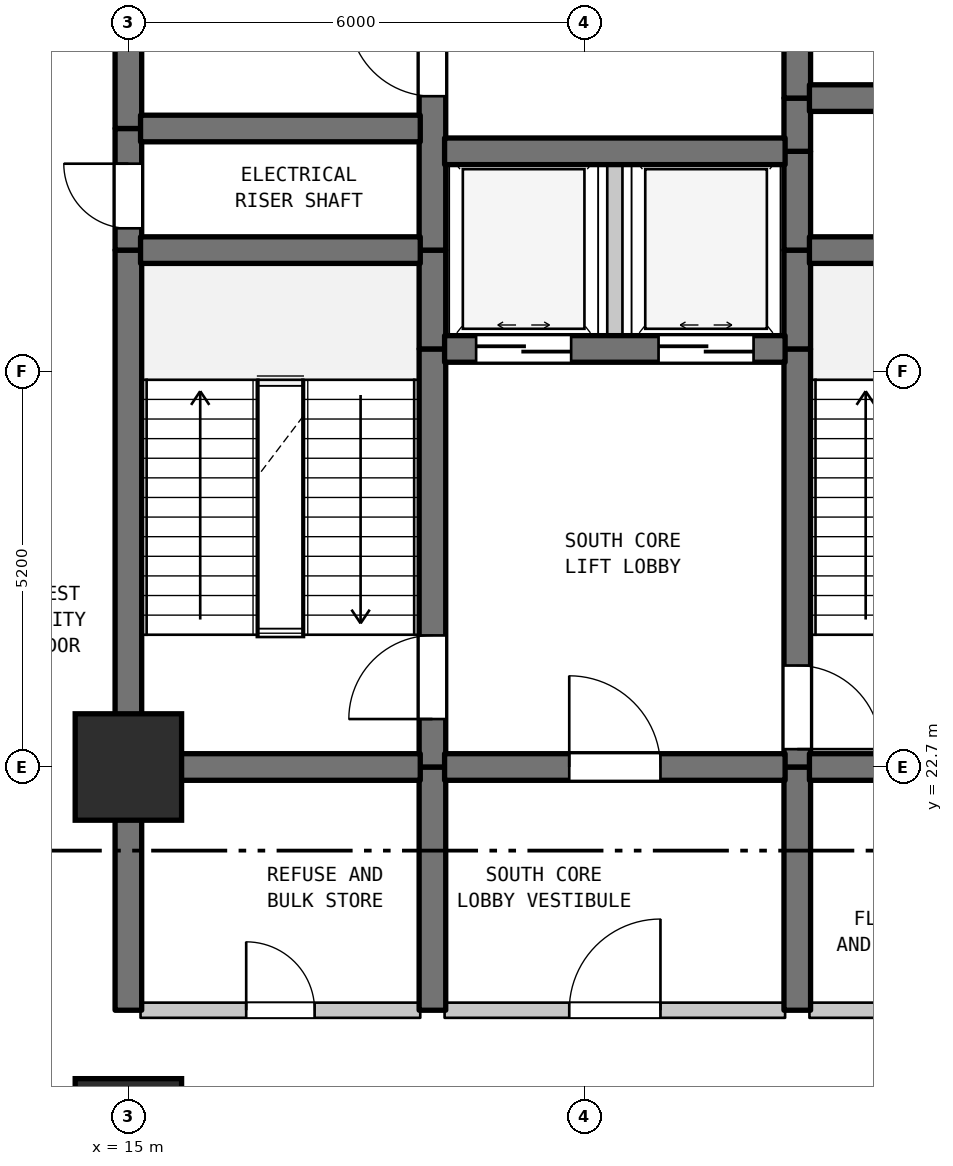
"""IFC4 building model, lengths in metres.
Left out: names, types, materials, properties, quantities, classifications, styles, units other than length and angle.
Written with IfcOpenShell. Run it as: python <this file> out.ifc"""

import sys

from ifc_helpers import new_model, si_unit, direction, frame, frame_2d, origin, origin_2d, place, context, subcontext, project, spatial, rectangle, extrude, element, fill, save


model = new_model("IFC4")
c1 = context("Model", 3, precision=1e-05, world=origin(), true_north=direction((0.0, 1.0)))
c2 = subcontext(c1, "Body", "Model", "MODEL_VIEW")
j1 = project(units=[si_unit("LENGTHUNIT", "METRE"), si_unit("PLANEANGLEUNIT", "RADIAN")], contexts=[c1])
p1 = place(None, origin())
s1 = spatial("IfcSite", under=j1, at=p1, CompositionType="ELEMENT")
p2 = place(p1, origin())
s2 = spatial("IfcBuilding", under=s1, at=p2, CompositionType="ELEMENT")
p3 = place(p2, frame((0.0, 0.0, 19.0)))
s3 = spatial("IfcBuildingStorey", under=s2, at=p3, CompositionType="ELEMENT", Elevation=19.0)
for number, where, z_axis, x_axis in (
    (1, (15.0, 17.9, 0.0), (0.0, 0.0, 1.0), (1.0, 0.0, 0.0)),
    (2, (15.0, 22.7, 0.0), (0.0, 0.0, 1.0), (1.0, 0.0, 0.0)),
):
    element("IfcColumn", number, at=place(p3, frame(where, z_axis=z_axis, x_axis=x_axis)), inside=s3, PredefinedType="COLUMN", context=c2, shape_type="SweptSolid", body=[
        extrude(rectangle(XDim=1.4, YDim=1.4, at=origin_2d()), origin(), (0.0, 0.0, 1.0), 5.0),
    ])
p4 = place(p3, frame((15.0, 19.5, 0.0), z_axis=(0.0, 0.0, 1.0), x_axis=(0.0, 1.0, 0.0)))
e3 = element("IfcWall", 3, at=p4, inside=s3, PredefinedType="SHEAR", context=c2, shape_type="SweptSolid", body=[
    extrude(rectangle(XDim=3.2, YDim=0.35, at=frame_2d((1.6, 0.0))), origin(), (0.0, 0.0, 1.0), 4.685),
])
p5 = place(p3, frame((15.0, 22.7, 0.0), z_axis=(0.0, 0.0, 1.0), x_axis=(0.0, 1.0, 0.0)))
e4 = element("IfcWall", 4, at=p5, inside=s3, PredefinedType="SHEAR", context=c2, shape_type="SweptSolid", body=[
    extrude(rectangle(XDim=6.8, YDim=0.35, at=frame_2d((3.4, 0.0))), origin(), (0.0, 0.0, 1.0), 4.685),
])
p6 = place(p3, frame((15.0, 29.5, 0.0), z_axis=(0.0, 0.0, 1.0), x_axis=(0.0, 1.0, 0.0)))
e5 = element("IfcWall", 5, at=p6, inside=s3, PredefinedType="SHEAR", context=c2, shape_type="SweptSolid", body=[
    extrude(rectangle(XDim=1.6, YDim=0.35, at=frame_2d((0.8, 0.0))), origin(), (0.0, 0.0, 1.0), 4.685),
])
p7 = place(p6, frame((0.287, 0.0, 0.0)))
e6 = element("IfcOpeningElement", 6, at=p7, cuts=e5, PredefinedType="OPENING", context=c2, shape_type="SweptSolid", body=[
    extrude(rectangle(XDim=0.85, YDim=2.1, at=frame_2d((0.425, 1.05))), frame((0.0, 0.185, 0.0), z_axis=(0.0, -1.0, 0.0), x_axis=(1.0, 0.0, 0.0)), (0.0, 0.0, 1.0), 0.37),
])
p8 = place(p3, frame((15.0, 31.1, 0.0), z_axis=(0.0, 0.0, 1.0), x_axis=(0.0, 1.0, 0.0)))
e7 = element("IfcWall", 7, at=p8, inside=s3, PredefinedType="SHEAR", context=c2, shape_type="SweptSolid", body=[
    extrude(rectangle(XDim=6.8, YDim=0.35, at=frame_2d((3.4, 0.0))), origin(), (0.0, 0.0, 1.0), 4.685),
])
p9 = place(p3, frame((19.0, 19.5, 0.0), z_axis=(0.0, 0.0, 1.0), x_axis=(0.0, 1.0, 0.0)))
e8 = element("IfcWall", 8, at=p9, inside=s3, PredefinedType="SHEAR", context=c2, shape_type="SweptSolid", body=[
    extrude(rectangle(XDim=3.2, YDim=0.35, at=frame_2d((1.6, 0.0))), origin(), (0.0, 0.0, 1.0), 4.685),
])
p10 = place(p3, frame((19.0, 22.7, 0.0), z_axis=(0.0, 0.0, 1.0), x_axis=(0.0, 1.0, 0.0)))
e9 = element("IfcWall", 9, at=p10, inside=s3, PredefinedType="SHEAR", context=c2, shape_type="SweptSolid", body=[
    extrude(rectangle(XDim=5.5, YDim=0.35, at=frame_2d((2.75, 0.0))), origin(), (0.0, 0.0, 1.0), 4.685),
])
p11 = place(p10, frame((0.631, 0.0, 0.0)))
e10 = element("IfcOpeningElement", 10, at=p11, cuts=e9, PredefinedType="OPENING", context=c2, shape_type="SweptSolid", body=[
    extrude(rectangle(XDim=1.1, YDim=2.15, at=frame_2d((0.55, 1.075))), frame((0.0, 0.185, 0.0), z_axis=(0.0, -1.0, 0.0), x_axis=(1.0, 0.0, 0.0)), (0.0, 0.0, 1.0), 0.37),
])
p12 = place(p3, frame((19.0, 28.2, 0.0), z_axis=(0.0, 0.0, 1.0), x_axis=(0.0, 1.0, 0.0)))
e11 = element("IfcWall", 11, at=p12, inside=s3, PredefinedType="SHEAR", context=c2, shape_type="SweptSolid", body=[
    extrude(rectangle(XDim=1.3, YDim=0.35, at=frame_2d((0.65, 0.0))), origin(), (0.0, 0.0, 1.0), 4.685),
])
p13 = place(p3, frame((19.0, 29.5, 0.0), z_axis=(0.0, 0.0, 1.0), x_axis=(0.0, 1.0, 0.0)))
e12 = element("IfcWall", 12, at=p13, inside=s3, PredefinedType="SHEAR", context=c2, shape_type="SweptSolid", body=[
    extrude(rectangle(XDim=5.5, YDim=0.35, at=frame_2d((2.75, 0.0))), origin(), (0.0, 0.0, 1.0), 4.685),
])
p14 = place(p13, frame((2.025, 0.0, 0.0)))
e13 = element("IfcOpeningElement", 13, at=p14, cuts=e12, PredefinedType="OPENING", context=c2, shape_type="SweptSolid", body=[
    extrude(rectangle(XDim=1.1, YDim=2.15, at=frame_2d((0.55, 1.075))), frame((0.0, 0.185, 0.0), z_axis=(0.0, -1.0, 0.0), x_axis=(1.0, 0.0, 0.0)), (0.0, 0.0, 1.0), 0.37),
])
p15 = place(p3, frame((21.4, 28.2, 0.0), z_axis=(0.0, 0.0, 1.0), x_axis=(0.0, 1.0, 0.0)))
e14 = element("IfcWall", 14, at=p15, inside=s3, PredefinedType="STANDARD", context=c2, shape_type="SweptSolid", body=[
    extrude(rectangle(XDim=2.6, YDim=0.2, at=frame_2d((1.3, 0.0))), origin(), (0.0, 0.0, 1.0), 4.685),
])
p16 = place(p3, frame((23.8, 19.5, 0.0), z_axis=(0.0, 0.0, 1.0), x_axis=(0.0, 1.0, 0.0)))
e15 = element("IfcWall", 15, at=p16, inside=s3, PredefinedType="SHEAR", context=c2, shape_type="SweptSolid", body=[
    extrude(rectangle(XDim=3.2, YDim=0.35, at=frame_2d((1.6, 0.0))), origin(), (0.0, 0.0, 1.0), 4.685),
])
p17 = place(p3, frame((23.8, 22.7, 0.0), z_axis=(0.0, 0.0, 1.0), x_axis=(0.0, 1.0, 0.0)))
e16 = element("IfcWall", 16, at=p17, inside=s3, PredefinedType="SHEAR", context=c2, shape_type="SweptSolid", body=[
    extrude(rectangle(XDim=5.5, YDim=0.35, at=frame_2d((2.75, 0.0))), origin(), (0.0, 0.0, 1.0), 4.685),
])
p18 = place(p17, frame((0.235, 0.0, 0.0)))
e17 = element("IfcOpeningElement", 17, at=p18, cuts=e16, PredefinedType="OPENING", context=c2, shape_type="SweptSolid", body=[
    extrude(rectangle(XDim=1.1, YDim=2.15, at=frame_2d((0.55, 1.075))), frame((0.0, 0.185, 0.0), z_axis=(0.0, -1.0, 0.0), x_axis=(1.0, 0.0, 0.0)), (0.0, 0.0, 1.0), 0.37),
])
for number, where, z_axis, x_axis in (
    (18, (23.8, 28.2, 0.0), (0.0, 0.0, 1.0), (0.0, 1.0, 0.0)),
    (19, (23.8, 29.5, 0.0), (0.0, 0.0, 1.0), (0.0, 1.0, 0.0)),
):
    element("IfcWall", number, at=place(p3, frame(where, z_axis=z_axis, x_axis=x_axis)), inside=s3, PredefinedType="SHEAR", context=c2, shape_type="SweptSolid", body=[
        extrude(rectangle(XDim=1.3, YDim=0.35, at=frame_2d((0.65, 0.0))), origin(), (0.0, 0.0, 1.0), 4.685),
    ])
p19 = place(p3, frame((23.8, 30.8, 0.0), z_axis=(0.0, 0.0, 1.0), x_axis=(0.0, 1.0, 0.0)))
e20 = element("IfcWall", 20, at=p19, inside=s3, PredefinedType="SHEAR", context=c2, shape_type="SweptSolid", body=[
    extrude(rectangle(XDim=0.7, YDim=0.35, at=frame_2d((0.35, 0.0))), origin(), (0.0, 0.0, 1.0), 4.685),
])
p20 = place(p3, frame((23.8, 31.5, 0.0), z_axis=(0.0, 0.0, 1.0), x_axis=(0.0, 1.0, 0.0)))
e21 = element("IfcWall", 21, at=p20, inside=s3, PredefinedType="SHEAR", context=c2, shape_type="SweptSolid", body=[
    extrude(rectangle(XDim=3.5, YDim=0.35, at=frame_2d((1.75, 0.0))), origin(), (0.0, 0.0, 1.0), 4.685),
])
p21 = place(p20, frame((1.127, 0.0, 0.0)))
e22 = element("IfcOpeningElement", 22, at=p21, cuts=e21, PredefinedType="OPENING", context=c2, shape_type="SweptSolid", body=[
    extrude(rectangle(XDim=1.1, YDim=2.15, at=frame_2d((0.55, 1.075))), frame((0.0, 0.185, 0.0), z_axis=(0.0, -1.0, 0.0), x_axis=(1.0, 0.0, 0.0)), (0.0, 0.0, 1.0), 0.37),
])
p22 = place(p3, frame((15.16, 19.5, 0.0), z_axis=(0.0, 0.0, 1.0), x_axis=(1.0, 0.0, 0.0)))
e23 = element("IfcWall", 23, at=p22, inside=s3, PredefinedType="STANDARD", context=c2, shape_type="SweptSolid", body=[
    extrude(rectangle(XDim=3.68, YDim=0.2, at=frame_2d((1.84, 0.0))), origin(), (0.0, 0.0, 1.0), 4.685),
])
p23 = place(p22, frame((1.39, 0.0, 0.0)))
e24 = element("IfcOpeningElement", 24, at=p23, cuts=e23, PredefinedType="OPENING", context=c2, shape_type="SweptSolid", body=[
    extrude(rectangle(XDim=0.9, YDim=2.15, at=frame_2d((0.45, 1.075))), frame((0.0, 0.11, 0.0), z_axis=(0.0, -1.0, 0.0), x_axis=(1.0, 0.0, 0.0)), (0.0, 0.0, 1.0), 0.22),
])
p24 = place(p3, frame((19.16, 19.5, 0.0), z_axis=(0.0, 0.0, 1.0), x_axis=(1.0, 0.0, 0.0)))
e25 = element("IfcWall", 25, at=p24, inside=s3, PredefinedType="STANDARD", context=c2, shape_type="SweptSolid", body=[
    extrude(rectangle(XDim=4.48, YDim=0.2, at=frame_2d((2.24, 0.0))), origin(), (0.0, 0.0, 1.0), 4.685),
])
p25 = place(p24, frame((1.64, 0.0, 0.0)))
e26 = element("IfcOpeningElement", 26, at=p25, cuts=e25, PredefinedType="OPENING", context=c2, shape_type="SweptSolid", body=[
    extrude(rectangle(XDim=1.2, YDim=2.2, at=frame_2d((0.6, 1.1))), frame((0.0, 0.11, 0.0), z_axis=(0.0, -1.0, 0.0), x_axis=(1.0, 0.0, 0.0)), (0.0, 0.0, 1.0), 0.22),
])
p26 = place(p3, frame((23.96, 19.5, 0.0), z_axis=(0.0, 0.0, 1.0), x_axis=(1.0, 0.0, 0.0)))
e27 = element("IfcWall", 27, at=p26, inside=s3, PredefinedType="STANDARD", context=c2, shape_type="SweptSolid", body=[
    extrude(rectangle(XDim=3.155, YDim=0.2, at=frame_2d((1.578, 0.0))), origin(), (0.0, 0.0, 1.0), 4.685),
])
p27 = place(p26, frame((0.991, 0.0, 0.0)))
e28 = element("IfcOpeningElement", 28, at=p27, cuts=e27, PredefinedType="OPENING", context=c2, shape_type="SweptSolid", body=[
    extrude(rectangle(XDim=0.95, YDim=2.15, at=frame_2d((0.475, 1.075))), frame((0.0, 0.11, 0.0), z_axis=(0.0, -1.0, 0.0), x_axis=(1.0, 0.0, 0.0)), (0.0, 0.0, 1.0), 0.22),
])
p28 = place(p3, frame((15.16, 22.7, 0.0), z_axis=(0.0, 0.0, 1.0), x_axis=(1.0, 0.0, 0.0)))
e29 = element("IfcWall", 29, at=p28, inside=s3, PredefinedType="SHEAR", context=c2, shape_type="SweptSolid", body=[
    extrude(rectangle(XDim=3.68, YDim=0.35, at=frame_2d((1.84, 0.0))), origin(), (0.0, 0.0, 1.0), 4.685),
])
p29 = place(p3, frame((19.16, 22.7, 0.0), z_axis=(0.0, 0.0, 1.0), x_axis=(1.0, 0.0, 0.0)))
e30 = element("IfcWall", 30, at=p29, inside=s3, PredefinedType="SHEAR", context=c2, shape_type="SweptSolid", body=[
    extrude(rectangle(XDim=4.48, YDim=0.35, at=frame_2d((2.24, 0.0))), origin(), (0.0, 0.0, 1.0), 4.685),
])
p30 = place(p29, frame((1.64, 0.0, 0.0)))
e31 = element("IfcOpeningElement", 31, at=p30, cuts=e30, PredefinedType="OPENING", context=c2, shape_type="SweptSolid", body=[
    extrude(rectangle(XDim=1.2, YDim=2.2, at=frame_2d((0.6, 1.1))), frame((0.0, 0.185, 0.0), z_axis=(0.0, -1.0, 0.0), x_axis=(1.0, 0.0, 0.0)), (0.0, 0.0, 1.0), 0.37),
])
p31 = place(p3, frame((23.96, 22.7, 0.0), z_axis=(0.0, 0.0, 1.0), x_axis=(1.0, 0.0, 0.0)))
e32 = element("IfcWall", 32, at=p31, inside=s3, PredefinedType="SHEAR", context=c2, shape_type="SweptSolid", body=[
    extrude(rectangle(XDim=3.155, YDim=0.35, at=frame_2d((1.578, 0.0))), origin(), (0.0, 0.0, 1.0), 4.685),
])
p32 = place(p3, frame((19.16, 28.2, 0.0), z_axis=(0.0, 0.0, 1.0), x_axis=(1.0, 0.0, 0.0)))
e33 = element("IfcWall", 33, at=p32, inside=s3, PredefinedType="SHEAR", context=c2, shape_type="SweptSolid", body=[
    extrude(rectangle(XDim=4.48, YDim=0.35, at=frame_2d((2.24, 0.0))), origin(), (0.0, 0.0, 1.0), 4.685),
])
p33 = place(p32, frame((0.415, 0.0, 0.0)))
e34 = element("IfcOpeningElement", 34, at=p33, cuts=e33, PredefinedType="OPENING", context=c2, shape_type="SweptSolid", body=[
    extrude(rectangle(XDim=1.25, YDim=2.2, at=frame_2d((0.625, 1.1))), frame((0.0, 0.185, 0.0), z_axis=(0.0, -1.0, 0.0), x_axis=(1.0, 0.0, 0.0)), (0.0, 0.0, 1.0), 0.37),
])
p34 = place(p32, frame((2.815, 0.0, 0.0)))
e35 = element("IfcOpeningElement", 35, at=p34, cuts=e33, PredefinedType="OPENING", context=c2, shape_type="SweptSolid", body=[
    extrude(rectangle(XDim=1.25, YDim=2.2, at=frame_2d((0.625, 1.1))), frame((0.0, 0.185, 0.0), z_axis=(0.0, -1.0, 0.0), x_axis=(1.0, 0.0, 0.0)), (0.0, 0.0, 1.0), 0.37),
])
p35 = place(p3, frame((15.16, 29.5, 0.0), z_axis=(0.0, 0.0, 1.0), x_axis=(1.0, 0.0, 0.0)))
e36 = element("IfcWall", 36, at=p35, inside=s3, PredefinedType="SHEAR", context=c2, shape_type="SweptSolid", body=[
    extrude(rectangle(XDim=3.68, YDim=0.35, at=frame_2d((1.84, 0.0))), origin(), (0.0, 0.0, 1.0), 4.685),
])
p36 = place(p3, frame((23.96, 29.5, 0.0), z_axis=(0.0, 0.0, 1.0), x_axis=(1.0, 0.0, 0.0)))
e37 = element("IfcWall", 37, at=p36, inside=s3, PredefinedType="SHEAR", context=c2, shape_type="SweptSolid", body=[
    extrude(rectangle(XDim=3.18, YDim=0.35, at=frame_2d((1.59, 0.0))), origin(), (0.0, 0.0, 1.0), 4.685),
])
p37 = place(p3, frame((19.16, 30.8, 0.0), z_axis=(0.0, 0.0, 1.0), x_axis=(1.0, 0.0, 0.0)))
e38 = element("IfcWall", 38, at=p37, inside=s3, PredefinedType="SHEAR", context=c2, shape_type="SweptSolid", body=[
    extrude(rectangle(XDim=4.48, YDim=0.35, at=frame_2d((2.24, 0.0))), origin(), (0.0, 0.0, 1.0), 4.685),
])
p38 = place(p3, frame((15.16, 31.1, 0.0), z_axis=(0.0, 0.0, 1.0), x_axis=(1.0, 0.0, 0.0)))
e39 = element("IfcWall", 39, at=p38, inside=s3, PredefinedType="SHEAR", context=c2, shape_type="SweptSolid", body=[
    extrude(rectangle(XDim=3.68, YDim=0.35, at=frame_2d((1.84, 0.0))), origin(), (0.0, 0.0, 1.0), 4.685),
])
p39 = place(p3, frame((23.96, 31.5, 0.0), z_axis=(0.0, 0.0, 1.0), x_axis=(1.0, 0.0, 0.0)))
e40 = element("IfcWall", 40, at=p39, inside=s3, PredefinedType="SHEAR", context=c2, shape_type="SweptSolid", body=[
    extrude(rectangle(XDim=3.18, YDim=0.35, at=frame_2d((1.59, 0.0))), origin(), (0.0, 0.0, 1.0), 4.685),
])
p40 = place(p39, frame((1.094, 0.0, 0.0)))
e41 = element("IfcOpeningElement", 41, at=p40, cuts=e40, PredefinedType="OPENING", context=c2, shape_type="SweptSolid", body=[
    extrude(rectangle(XDim=0.85, YDim=2.1, at=frame_2d((0.425, 1.05))), frame((0.0, 0.185, 0.0), z_axis=(0.0, -1.0, 0.0), x_axis=(1.0, 0.0, 0.0)), (0.0, 0.0, 1.0), 0.37),
])
p41 = place(p3, frame((17.64, 9.686, 0.0), z_axis=(0.0, 0.0, 1.0), x_axis=(-0.747409318684, 0.66436383883, 0.0)))
e42 = element("IfcWall", 42, at=p41, inside=s3, PredefinedType="STANDARD", context=c2, shape_type="SweptSolid", body=[
    extrude(rectangle(XDim=18.204, YDim=0.26, at=frame_2d((9.102, 0.0))), origin(), (0.0, 0.0, 1.0), 4.685),
])
p42 = place(p41, origin())
e43 = element("IfcOpeningElement", 43, at=p42, cuts=e42, PredefinedType="OPENING", context=c2, shape_type="SweptSolid", body=[
    extrude(rectangle(XDim=1.4, YDim=2.2, at=frame_2d((0.7, 1.1))), frame((0.0, 0.14, 0.0), z_axis=(0.0, -1.0, 0.0), x_axis=(1.0, 0.0, 0.0)), (0.0, 0.0, 1.0), 0.28),
])
p43 = place(p41, frame((6.154, 0.0, 0.9)))
e44 = element("IfcOpeningElement", 44, at=p43, cuts=e42, PredefinedType="OPENING", context=c2, shape_type="SweptSolid", body=[
    extrude(rectangle(XDim=1.3, YDim=1.9, at=frame_2d((0.65, 0.95))), frame((0.0, 0.14, 0.0), z_axis=(0.0, -1.0, 0.0), x_axis=(1.0, 0.0, 0.0)), (0.0, 0.0, 1.0), 0.28),
])
p44 = place(p41, frame((8.587, 0.0, 0.9)))
e45 = element("IfcOpeningElement", 45, at=p44, cuts=e42, PredefinedType="OPENING", context=c2, shape_type="SweptSolid", body=[
    extrude(rectangle(XDim=1.4, YDim=1.85, at=frame_2d((0.7, 0.925))), frame((0.0, 0.14, 0.0), z_axis=(0.0, -1.0, 0.0), x_axis=(1.0, 0.0, 0.0)), (0.0, 0.0, 1.0), 0.28),
])
p45 = place(p41, frame((13.454, 0.0, 0.9)))
e46 = element("IfcOpeningElement", 46, at=p45, cuts=e42, PredefinedType="OPENING", context=c2, shape_type="SweptSolid", body=[
    extrude(rectangle(XDim=1.3, YDim=1.9, at=frame_2d((0.65, 0.95))), frame((0.0, 0.14, 0.0), z_axis=(0.0, -1.0, 0.0), x_axis=(1.0, 0.0, 0.0)), (0.0, 0.0, 1.0), 0.28),
])
p46 = place(p41, frame((15.887, 0.0, 0.9)))
e47 = element("IfcOpeningElement", 47, at=p46, cuts=e42, PredefinedType="OPENING", context=c2, shape_type="SweptSolid", body=[
    extrude(rectangle(XDim=1.4, YDim=1.85, at=frame_2d((0.7, 0.925))), frame((0.0, 0.14, 0.0), z_axis=(0.0, -1.0, 0.0), x_axis=(1.0, 0.0, 0.0)), (0.0, 0.0, 1.0), 0.28),
])
p47 = place(p7, origin())
e48 = element("IfcDoor", 48, at=p47, inside=s3, OperationType="SINGLE_SWING_RIGHT", PredefinedType="DOOR", context=c2, shape_type="SweptSolid", body=[
    extrude(rectangle(XDim=0.85, YDim=2.1, at=frame_2d((0.425, 1.05))), frame((0.0, 0.025, 0.0), z_axis=(0.0, -1.0, 0.0), x_axis=(1.0, 0.0, 0.0)), (0.0, 0.0, 1.0), 0.05),
])
fill(e6, e48)
p48 = place(p11, origin())
e49 = element("IfcDoor", 49, at=p48, inside=s3, OperationType="SINGLE_SWING_LEFT", PredefinedType="DOOR", context=c2, shape_type="SweptSolid", body=[
    extrude(rectangle(XDim=1.1, YDim=2.15, at=frame_2d((0.55, 1.075))), frame((0.0, 0.025, 0.0), z_axis=(0.0, -1.0, 0.0), x_axis=(1.0, 0.0, 0.0)), (0.0, 0.0, 1.0), 0.05),
])
fill(e10, e49)
p49 = place(p14, origin())
e50 = element("IfcDoor", 50, at=p49, inside=s3, OperationType="SINGLE_SWING_RIGHT", PredefinedType="DOOR", context=c2, shape_type="SweptSolid", body=[
    extrude(rectangle(XDim=1.1, YDim=2.15, at=frame_2d((0.55, 1.075))), frame((0.0, 0.025, 0.0), z_axis=(0.0, -1.0, 0.0), x_axis=(1.0, 0.0, 0.0)), (0.0, 0.0, 1.0), 0.05),
])
fill(e13, e50)
p50 = place(p18, frame((1.1, 0.0, 0.0), z_axis=(0.0, 0.0, 1.0), x_axis=(-1.0, 0.0, 0.0)))
e51 = element("IfcDoor", 51, at=p50, inside=s3, OperationType="SINGLE_SWING_LEFT", PredefinedType="DOOR", context=c2, shape_type="SweptSolid", body=[
    extrude(rectangle(XDim=1.1, YDim=2.15, at=frame_2d((0.55, 1.075))), frame((0.0, 0.025, 0.0), z_axis=(0.0, -1.0, 0.0), x_axis=(1.0, 0.0, 0.0)), (0.0, 0.0, 1.0), 0.05),
])
fill(e17, e51)
p51 = place(p23, origin())
e52 = element("IfcDoor", 52, at=p51, inside=s3, OperationType="SINGLE_SWING_LEFT", PredefinedType="DOOR", context=c2, shape_type="SweptSolid", body=[
    extrude(rectangle(XDim=0.9, YDim=2.15, at=frame_2d((0.45, 1.075))), frame((0.0, 0.025, 0.0), z_axis=(0.0, -1.0, 0.0), x_axis=(1.0, 0.0, 0.0)), (0.0, 0.0, 1.0), 0.05),
])
fill(e24, e52)
p52 = place(p25, origin())
e53 = element("IfcDoor", 53, at=p52, inside=s3, OperationType="SINGLE_SWING_RIGHT", PredefinedType="DOOR", context=c2, shape_type="SweptSolid", body=[
    extrude(rectangle(XDim=1.2, YDim=2.2, at=frame_2d((0.6, 1.1))), frame((0.0, 0.025, 0.0), z_axis=(0.0, -1.0, 0.0), x_axis=(1.0, 0.0, 0.0)), (0.0, 0.0, 1.0), 0.05),
])
fill(e26, e53)
p53 = place(p30, origin())
e54 = element("IfcDoor", 54, at=p53, inside=s3, OperationType="SINGLE_SWING_LEFT", PredefinedType="DOOR", context=c2, shape_type="SweptSolid", body=[
    extrude(rectangle(XDim=1.2, YDim=2.2, at=frame_2d((0.6, 1.1))), frame((0.0, 0.025, 0.0), z_axis=(0.0, -1.0, 0.0), x_axis=(1.0, 0.0, 0.0)), (0.0, 0.0, 1.0), 0.05),
])
fill(e31, e54)
p54 = place(p33, origin())
e55 = element("IfcDoor", 55, at=p54, inside=s3, OperationType="DOUBLE_DOOR_SLIDING", PredefinedType="DOOR", context=c2, shape_type="SweptSolid", body=[
    extrude(rectangle(XDim=1.25, YDim=2.2, at=frame_2d((0.625, 1.1))), frame((0.0, 0.025, 0.0), z_axis=(0.0, -1.0, 0.0), x_axis=(1.0, 0.0, 0.0)), (0.0, 0.0, 1.0), 0.05),
])
fill(e34, e55)
p55 = place(p34, origin())
e56 = element("IfcDoor", 56, at=p55, inside=s3, OperationType="DOUBLE_DOOR_SLIDING", PredefinedType="DOOR", context=c2, shape_type="SweptSolid", body=[
    extrude(rectangle(XDim=1.25, YDim=2.2, at=frame_2d((0.625, 1.1))), frame((0.0, 0.025, 0.0), z_axis=(0.0, -1.0, 0.0), x_axis=(1.0, 0.0, 0.0)), (0.0, 0.0, 1.0), 0.05),
])
fill(e35, e56)
save(model, sys.argv[1])
